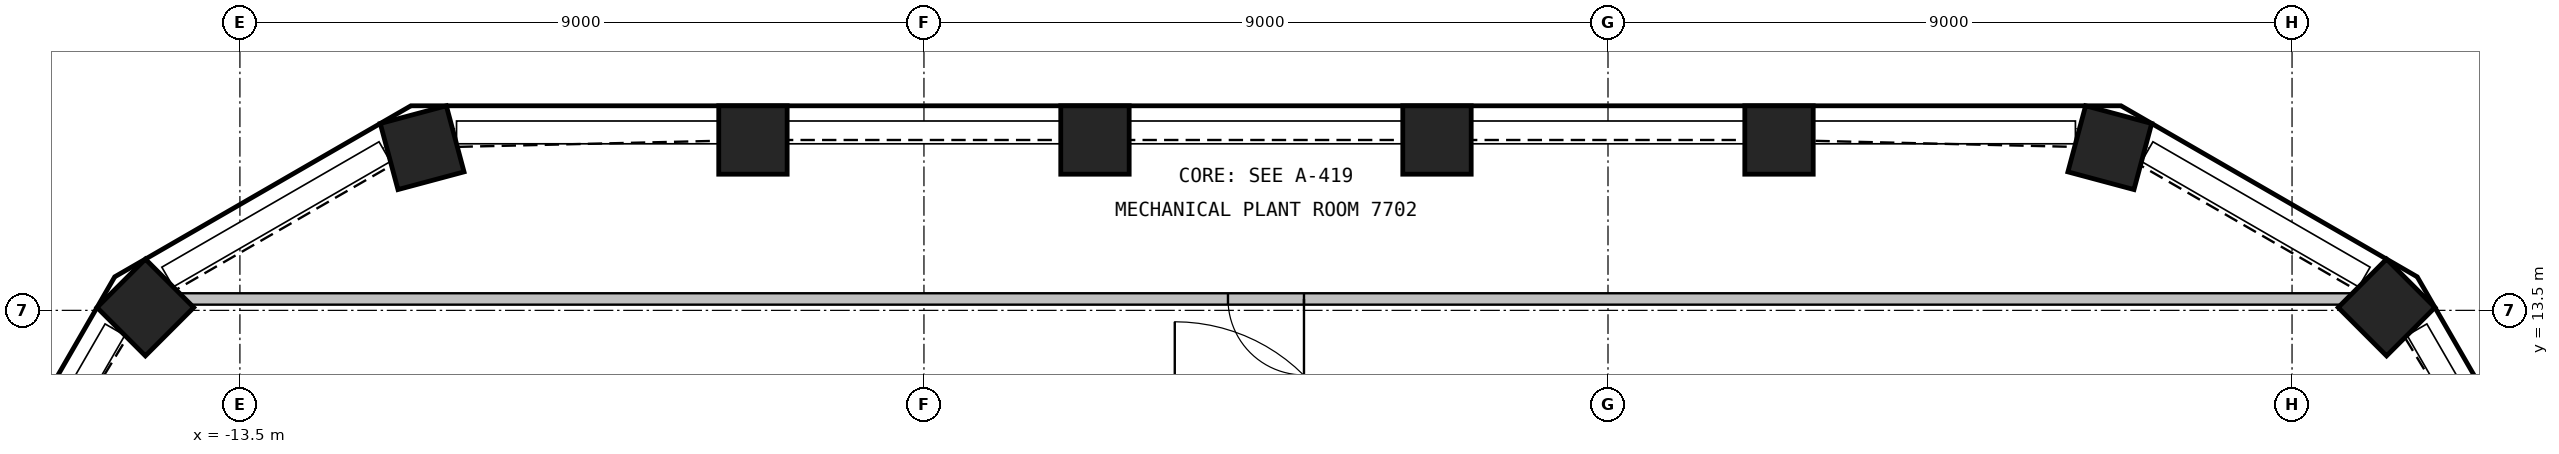
"""IFC4 building model, lengths in metres.
Left out: names, types, materials, properties, quantities, classifications, styles, units other than length and angle.
Written with IfcOpenShell. Run it as: python <this file> out.ifc"""

import sys

from ifc_helpers import new_model, si_unit, direction, frame, frame_2d, origin, origin_2d, place, context, subcontext, project, spatial, rectangle, extrude, element, fill, save


model = new_model("IFC4")
c1 = context("Model", 3, precision=1e-05, world=origin(), true_north=direction((0.0, 1.0)))
c2 = subcontext(c1, "Body", "Model", "MODEL_VIEW")
j1 = project(units=[si_unit("LENGTHUNIT", "METRE"), si_unit("PLANEANGLEUNIT", "RADIAN")], contexts=[c1])
p1 = place(None, origin())
s1 = spatial("IfcSite", under=j1, at=p1, CompositionType="ELEMENT")
p2 = place(p1, origin())
s2 = spatial("IfcBuilding", under=s1, at=p2, CompositionType="ELEMENT")
p3 = place(p2, frame((0.0, 0.0, 309.9)))
s3 = spatial("IfcBuildingStorey", under=s2, at=p3, CompositionType="ELEMENT", Elevation=309.9)
for number, where, z_axis, x_axis in (
    (1, (14.744, 13.538, 0.0), (0.0, 0.0, 1.0), (-0.707, 0.707, 0.0)),
    (2, (11.102, 15.64, 0.0), (0.0, 0.0, 1.0), (-0.966, 0.259, 0.0)),
    (3, (6.75, 15.741, 0.0), (0.0, 0.0, 1.0), (-1.0, 0.0, 0.0)),
    (4, (2.25, 15.741, 0.0), (0.0, 0.0, 1.0), (-1.0, 0.0, 0.0)),
    (5, (-2.25, 15.741, 0.0), (0.0, 0.0, 1.0), (-1.0, 0.0, 0.0)),
    (6, (-6.75, 15.741, 0.0), (0.0, 0.0, 1.0), (-1.0, 0.0, 0.0)),
    (7, (-11.102, 15.64, 0.0), (0.0, 0.0, 1.0), (-0.966, -0.259, 0.0)),
    (8, (-14.744, 13.538, 0.0), (0.0, 0.0, 1.0), (-0.707, -0.707, 0.0)),
):
    element("IfcColumn", number, at=place(p3, frame(where, z_axis=z_axis, x_axis=x_axis)), inside=s3, PredefinedType="COLUMN", context=c2, shape_type="SweptSolid", body=[
        extrude(rectangle(XDim=0.9, YDim=0.9, at=origin_2d()), origin(), (0.0, 0.0, 1.0), 8.55),
    ])
p4 = place(p3, frame((14.969, 13.65, 0.0), z_axis=(0.0, 0.0, 1.0), x_axis=(-1.0, 0.0, 0.0)))
e9 = element("IfcWall", 9, at=p4, inside=s3, PredefinedType="PARTITIONING", context=c2, shape_type="SweptSolid", body=[
    extrude(rectangle(XDim=29.938, YDim=0.15, at=frame_2d((14.969, 0.0))), origin(), (0.0, 0.0, 1.0), 8.55),
])
p5 = place(p4, frame((14.469, 0.0, 0.0)))
e10 = element("IfcOpeningElement", 10, at=p5, cuts=e9, PredefinedType="OPENING", context=c2, shape_type="SweptSolid", body=[
    extrude(rectangle(XDim=1.0, YDim=2.1, at=frame_2d((0.5, 1.05))), frame((0.0, 0.085, 0.0), z_axis=(0.0, -1.0, 0.0), x_axis=(1.0, 0.0, 0.0)), (0.0, 0.0, 1.0), 0.17),
])
p6 = place(p5, origin())
e11 = element("IfcDoor", 11, at=p6, inside=s3, OperationType="SINGLE_SWING_LEFT", PredefinedType="DOOR", context=c2, shape_type="SweptSolid", body=[
    extrude(rectangle(XDim=1.0, YDim=2.1, at=frame_2d((0.5, 1.05))), frame((0.0, 0.025, 0.0), z_axis=(0.0, -1.0, 0.0), x_axis=(1.0, 0.0, 0.0)), (0.0, 0.0, 1.0), 0.05),
])
fill(e10, e11)
save(model, sys.argv[1])
